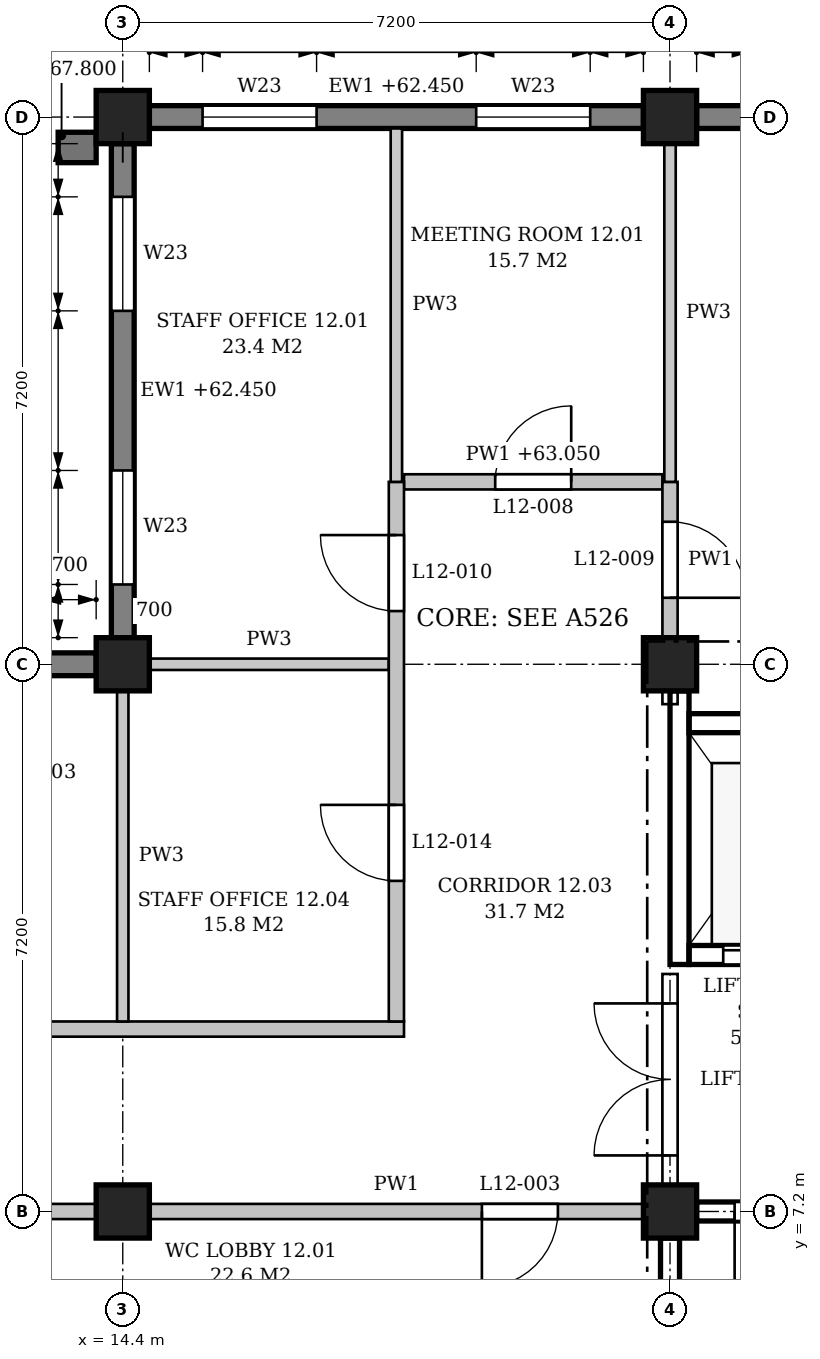
"""IFC4 building model, lengths in metres.
Left out: names, types, materials, properties, quantities, classifications, styles, units other than length and angle.
Written with IfcOpenShell. Run it as: python <this file> out.ifc"""

import sys

from ifc_helpers import new_model, si_unit, direction, frame, frame_2d, origin, origin_2d, place, context, subcontext, project, spatial, polyline, rectangle, outline, extrude, element, fill, save


model = new_model("IFC4")
c1 = context("Model", 3, precision=1e-05, world=origin(), true_north=direction((0.0, 1.0)))
c2 = subcontext(c1, "Body", "Model", "MODEL_VIEW")
j1 = project(units=[si_unit("LENGTHUNIT", "METRE"), si_unit("PLANEANGLEUNIT", "RADIAN")], contexts=[c1])
p1 = place(None, origin())
s1 = spatial("IfcSite", under=j1, at=p1, CompositionType="ELEMENT")
p2 = place(p1, origin())
s2 = spatial("IfcBuilding", under=s1, at=p2, CompositionType="ELEMENT")
p3 = place(p2, frame((0.0, 0.0, 58.8)))
s3 = spatial("IfcBuildingStorey", under=s2, at=p3, CompositionType="ELEMENT", Elevation=58.8)
for number, where, z_axis, x_axis in (
    (1, (14.4, 7.2, 0.0), (0.0, 0.0, 1.0), (1.0, 0.0, 0.0)),
    (2, (14.4, 14.4, 0.0), (0.0, 0.0, 1.0), (1.0, 0.0, 0.0)),
    (3, (14.4, 21.6, 0.0), (0.0, 0.0, 1.0), (1.0, 0.0, 0.0)),
    (4, (21.6, 7.2, 0.0), (0.0, 0.0, 1.0), (1.0, 0.0, 0.0)),
    (5, (21.6, 14.4, 0.0), (0.0, 0.0, 1.0), (1.0, 0.0, 0.0)),
    (6, (21.6, 21.6, 0.0), (0.0, 0.0, 1.0), (1.0, 0.0, 0.0)),
):
    element("IfcColumn", number, at=place(p3, frame(where, z_axis=z_axis, x_axis=x_axis)), inside=s3, PredefinedType="COLUMN", context=c2, shape_type="SweptSolid", body=[
        extrude(rectangle(XDim=0.7, YDim=0.7, at=origin_2d()), origin(), (0.0, 0.0, 1.0), 4.5),
    ])
p4 = place(p3, frame((28.45, 21.6, 0.0), z_axis=(0.0, 0.0, 1.0), x_axis=(-1.0, 0.0, 0.0)))
e7 = element("IfcWall", 7, at=p4, inside=s3, PredefinedType="STANDARD", context=c2, shape_type="SweptSolid", body=[
    extrude(rectangle(XDim=6.5, YDim=0.3, at=frame_2d((3.25, 0.0))), origin(), (0.0, 0.0, 1.0), 3.65),
])
p5 = place(p4, frame((0.7, 0.0, 0.9)))
e8 = element("IfcOpeningElement", 8, at=p5, cuts=e7, PredefinedType="OPENING", context=c2, shape_type="SweptSolid", body=[
    extrude(outline(polyline([(0.0, 0.0), (1.5, 0.0), (1.5, 1.95), (0.75, 2.7), (0.0, 1.95), (0.0, 0.0)])), frame((0.0, 0.16, 0.0), z_axis=(0.0, -1.0, 0.0), x_axis=(1.0, 0.0, 0.0)), (0.0, 0.0, 1.0), 0.32),
])
p6 = place(p4, frame((4.3, 0.0, 0.9)))
e9 = element("IfcOpeningElement", 9, at=p6, cuts=e7, PredefinedType="OPENING", context=c2, shape_type="SweptSolid", body=[
    extrude(outline(polyline([(0.0, 0.0), (1.5, 0.0), (1.5, 1.95), (0.75, 2.7), (0.0, 1.95), (0.0, 0.0)])), frame((0.0, 0.16, 0.0), z_axis=(0.0, -1.0, 0.0), x_axis=(1.0, 0.0, 0.0)), (0.0, 0.0, 1.0), 0.32),
])
p7 = place(p3, frame((21.25, 21.6, 0.0), z_axis=(0.0, 0.0, 1.0), x_axis=(-1.0, 0.0, 0.0)))
e10 = element("IfcWall", 10, at=p7, inside=s3, PredefinedType="STANDARD", context=c2, shape_type="SweptSolid", body=[
    extrude(rectangle(XDim=6.5, YDim=0.3, at=frame_2d((3.25, 0.0))), origin(), (0.0, 0.0, 1.0), 3.65),
])
p8 = place(p7, frame((0.7, 0.0, 0.9)))
e11 = element("IfcOpeningElement", 11, at=p8, cuts=e10, PredefinedType="OPENING", context=c2, shape_type="SweptSolid", body=[
    extrude(outline(polyline([(0.0, 0.0), (1.5, 0.0), (1.5, 1.95), (0.75, 2.7), (0.0, 1.95), (0.0, 0.0)])), frame((0.0, 0.16, 0.0), z_axis=(0.0, -1.0, 0.0), x_axis=(1.0, 0.0, 0.0)), (0.0, 0.0, 1.0), 0.32),
])
p9 = place(p7, frame((4.3, 0.0, 0.9)))
e12 = element("IfcOpeningElement", 12, at=p9, cuts=e10, PredefinedType="OPENING", context=c2, shape_type="SweptSolid", body=[
    extrude(outline(polyline([(0.0, 0.0), (1.5, 0.0), (1.5, 1.95), (0.75, 2.7), (0.0, 1.95), (0.0, 0.0)])), frame((0.0, 0.16, 0.0), z_axis=(0.0, -1.0, 0.0), x_axis=(1.0, 0.0, 0.0)), (0.0, 0.0, 1.0), 0.32),
])
p10 = place(p3, frame((14.05, 14.4, 0.0), z_axis=(0.0, 0.0, 1.0), x_axis=(-1.0, 0.0, 0.0)))
e13 = element("IfcWall", 13, at=p10, inside=s3, PredefinedType="STANDARD", context=c2, shape_type="SweptSolid", body=[
    extrude(rectangle(XDim=6.5, YDim=0.3, at=frame_2d((3.25, 0.0))), origin(), (0.0, 0.0, 1.0), 3.65),
])
p11 = place(p10, frame((0.7, 0.0, 0.9)))
e14 = element("IfcOpeningElement", 14, at=p11, cuts=e13, PredefinedType="OPENING", context=c2, shape_type="SweptSolid", body=[
    extrude(outline(polyline([(0.0, 0.0), (1.5, 0.0), (1.5, 1.95), (0.75, 2.7), (0.0, 1.95), (0.0, 0.0)])), frame((0.0, 0.16, 0.0), z_axis=(0.0, -1.0, 0.0), x_axis=(1.0, 0.0, 0.0)), (0.0, 0.0, 1.0), 0.32),
])
p12 = place(p10, frame((4.3, 0.0, 0.9)))
e15 = element("IfcOpeningElement", 15, at=p12, cuts=e13, PredefinedType="OPENING", context=c2, shape_type="SweptSolid", body=[
    extrude(outline(polyline([(0.0, 0.0), (1.5, 0.0), (1.5, 1.95), (0.75, 2.7), (0.0, 1.95), (0.0, 0.0)])), frame((0.0, 0.16, 0.0), z_axis=(0.0, -1.0, 0.0), x_axis=(1.0, 0.0, 0.0)), (0.0, 0.0, 1.0), 0.32),
])
p13 = place(p3, frame((14.4, 14.75, 0.0), z_axis=(0.0, 0.0, 1.0), x_axis=(0.0, 1.0, 0.0)))
e16 = element("IfcWall", 16, at=p13, inside=s3, PredefinedType="STANDARD", context=c2, shape_type="SweptSolid", body=[
    extrude(rectangle(XDim=6.5, YDim=0.3, at=frame_2d((3.25, 0.0))), origin(), (0.0, 0.0, 1.0), 3.65),
])
p14 = place(p13, frame((0.7, 0.0, 0.9)))
e17 = element("IfcOpeningElement", 17, at=p14, cuts=e16, PredefinedType="OPENING", context=c2, shape_type="SweptSolid", body=[
    extrude(outline(polyline([(0.0, 0.0), (1.5, 0.0), (1.5, 1.95), (0.75, 2.7), (0.0, 1.95), (0.0, 0.0)])), frame((0.0, 0.16, 0.0), z_axis=(0.0, -1.0, 0.0), x_axis=(1.0, 0.0, 0.0)), (0.0, 0.0, 1.0), 0.32),
])
p15 = place(p13, frame((4.3, 0.0, 0.9)))
e18 = element("IfcOpeningElement", 18, at=p15, cuts=e16, PredefinedType="OPENING", context=c2, shape_type="SweptSolid", body=[
    extrude(outline(polyline([(0.0, 0.0), (1.5, 0.0), (1.5, 1.95), (0.75, 2.7), (0.0, 1.95), (0.0, 0.0)])), frame((0.0, 0.16, 0.0), z_axis=(0.0, -1.0, 0.0), x_axis=(1.0, 0.0, 0.0)), (0.0, 0.0, 1.0), 0.32),
])
p16 = place(p3, frame((14.05, 21.2, -0.25), z_axis=(0.0, 0.0, 1.0), x_axis=(-1.0, 0.0, 0.0)))
e19 = element("IfcWall", 19, at=p16, inside=s3, PredefinedType="POLYGONAL", context=c2, shape_type="SweptSolid", body=[
    extrude(outline(polyline([(0.5, 0.0), (0.5, 8.725), (0.15, 9.25), (0.0, 9.25), (0.0, 0.0), (0.5, 0.0)])), frame((0.0, 0.2, 0.0), z_axis=(0.0, -1.0, 0.0), x_axis=(1.0, 0.0, 0.0)), (0.0, 0.0, 1.0), 0.4),
])
p17 = place(p3, frame((21.95, 7.2, 0.0), z_axis=(0.0, 0.0, 1.0), x_axis=(1.0, 0.0, 0.0)))
e20 = element("IfcWall", 20, at=p17, inside=s3, PredefinedType="SHEAR", context=c2, shape_type="SweptSolid", body=[
    extrude(rectangle(XDim=6.5, YDim=0.25, at=frame_2d((3.25, 0.0))), origin(), (0.0, 0.0, 1.0), 3.6),
])
p18 = place(p17, frame((0.5, 0.0, 0.0)))
e21 = element("IfcOpeningElement", 21, at=p18, cuts=e20, PredefinedType="OPENING", context=c2, shape_type="SweptSolid", body=[
    extrude(rectangle(XDim=1.1, YDim=2.1, at=frame_2d((0.55, 1.05))), frame((0.0, 0.135, 0.0), z_axis=(0.0, -1.0, 0.0), x_axis=(1.0, 0.0, 0.0)), (0.0, 0.0, 1.0), 0.27),
])
p19 = place(p3, frame((21.6, 0.35, 0.0), z_axis=(0.0, 0.0, 1.0), x_axis=(0.0, 1.0, 0.0)))
e22 = element("IfcWall", 22, at=p19, inside=s3, PredefinedType="SHEAR", context=c2, shape_type="SweptSolid", body=[
    extrude(rectangle(XDim=6.5, YDim=0.25, at=frame_2d((3.25, 0.0))), origin(), (0.0, 0.0, 1.0), 3.6),
])
p20 = place(p3, frame((21.725, 10.45, -0.25), z_axis=(0.0, 0.0, 1.0), x_axis=(0.0, 1.0, 0.0)))
e23 = element("IfcWall", 23, at=p20, inside=s3, PredefinedType="SHEAR", context=c2, shape_type="SweptSolid", body=[
    extrude(rectangle(XDim=3.6, YDim=0.25, at=frame_2d((1.8, 0.0))), origin(), (0.0, 0.0, 1.0), 3.85),
])
p21 = place(p3, frame((21.85, 10.575, -0.25), z_axis=(0.0, 0.0, 1.0), x_axis=(1.0, 0.0, 0.0)))
e24 = element("IfcWall", 24, at=p21, inside=s3, PredefinedType="SHEAR", context=c2, shape_type="SweptSolid", body=[
    extrude(rectangle(XDim=2.0, YDim=0.25, at=frame_2d((1.0, 0.0))), origin(), (0.0, 0.0, 1.0), 4.5),
])
p22 = place(p21, frame((0.45, 0.0, 0.25)))
e25 = element("IfcOpeningElement", 25, at=p22, cuts=e24, PredefinedType="OPENING", context=c2, shape_type="SweptSolid", body=[
    extrude(rectangle(XDim=1.1, YDim=2.1, at=frame_2d((0.55, 1.05))), frame((0.0, 0.135, 0.0), z_axis=(0.0, -1.0, 0.0), x_axis=(1.0, 0.0, 0.0)), (0.0, 0.0, 1.0), 0.27),
])
p23 = place(p3, frame((21.85, 13.625, -0.25), z_axis=(0.0, 0.0, 1.0), x_axis=(1.0, 0.0, 0.0)))
e26 = element("IfcWall", 26, at=p23, inside=s3, PredefinedType="SHEAR", context=c2, shape_type="SweptSolid", body=[
    extrude(rectangle(XDim=2.0, YDim=0.25, at=frame_2d((1.0, 0.0))), origin(), (0.0, 0.0, 1.0), 4.5),
])
p24 = place(p3, frame((7.55, 7.2, 0.0), z_axis=(0.0, 0.0, 1.0), x_axis=(1.0, 0.0, 0.0)))
e27 = element("IfcWall", 27, at=p24, inside=s3, PredefinedType="PARTITIONING", context=c2, shape_type="SweptSolid", body=[
    extrude(rectangle(XDim=6.5, YDim=0.2, at=frame_2d((3.25, 0.0))), origin(), (0.0, 0.0, 1.0), 3.6),
])
p25 = place(p24, frame((2.75, 0.0, 0.0)))
e28 = element("IfcOpeningElement", 28, at=p25, cuts=e27, PredefinedType="OPENING", context=c2, shape_type="SweptSolid", body=[
    extrude(rectangle(XDim=1.0, YDim=2.1, at=frame_2d((0.5, 1.05))), frame((0.0, 0.11, 0.0), z_axis=(0.0, -1.0, 0.0), x_axis=(1.0, 0.0, 0.0)), (0.0, 0.0, 1.0), 0.22),
])
p26 = place(p3, frame((14.75, 7.2, 0.0), z_axis=(0.0, 0.0, 1.0), x_axis=(1.0, 0.0, 0.0)))
e29 = element("IfcWall", 29, at=p26, inside=s3, PredefinedType="PARTITIONING", context=c2, shape_type="SweptSolid", body=[
    extrude(rectangle(XDim=6.5, YDim=0.2, at=frame_2d((3.25, 0.0))), origin(), (0.0, 0.0, 1.0), 3.6),
])
p27 = place(p26, frame((4.375, 0.0, 0.0)))
e30 = element("IfcOpeningElement", 30, at=p27, cuts=e29, PredefinedType="OPENING", context=c2, shape_type="SweptSolid", body=[
    extrude(rectangle(XDim=1.0, YDim=2.1, at=frame_2d((0.5, 1.05))), frame((0.0, 0.11, 0.0), z_axis=(0.0, -1.0, 0.0), x_axis=(1.0, 0.0, 0.0)), (0.0, 0.0, 1.0), 0.22),
])
p28 = place(p3, frame((3.5, 9.6, 0.0), z_axis=(0.0, 0.0, 1.0), x_axis=(1.0, 0.0, 0.0)))
e31 = element("IfcWall", 31, at=p28, inside=s3, PredefinedType="PARTITIONING", context=c2, shape_type="SweptSolid", body=[
    extrude(outline(polyline([(0.0, 0.0), (14.6, 0.0), (14.6, 4.25), (11.1, 4.25), (11.1, 3.6), (10.7, 3.6), (10.7, 4.25), (3.9, 4.25), (3.9, 3.6), (3.5, 3.6), (3.5, 4.25), (0.0, 4.25), (0.0, 0.0)])), frame((0.0, 0.1, 0.0), z_axis=(0.0, -1.0, 0.0), x_axis=(1.0, 0.0, 0.0)), (0.0, 0.0, 1.0), 0.2),
])
p29 = place(p28, frame((2.7, 0.0, 0.0)))
e32 = element("IfcOpeningElement", 32, at=p29, cuts=e31, PredefinedType="OPENING", context=c2, shape_type="SweptSolid", body=[
    extrude(rectangle(XDim=2.0, YDim=2.1, at=frame_2d((1.0, 1.05))), frame((0.0, 0.11, 0.0), z_axis=(0.0, -1.0, 0.0), x_axis=(1.0, 0.0, 0.0)), (0.0, 0.0, 1.0), 0.22),
])
p30 = place(p28, frame((8.6, 0.0, 0.0)))
e33 = element("IfcOpeningElement", 33, at=p30, cuts=e31, PredefinedType="OPENING", context=c2, shape_type="SweptSolid", body=[
    extrude(rectangle(XDim=1.0, YDim=2.1, at=frame_2d((0.5, 1.05))), frame((0.0, 0.11, 0.0), z_axis=(0.0, -1.0, 0.0), x_axis=(1.0, 0.0, 0.0)), (0.0, 0.0, 1.0), 0.22),
])
p31 = place(p3, frame((14.75, 14.4, 0.0), z_axis=(0.0, 0.0, 1.0), x_axis=(1.0, 0.0, 0.0)))
e34 = element("IfcWall", 34, at=p31, inside=s3, PredefinedType="PARTITIONING", context=c2, shape_type="SweptSolid", body=[
    extrude(rectangle(XDim=3.15, YDim=0.15, at=frame_2d((1.575, 0.0))), origin(), (0.0, 0.0, 1.0), 3.6),
])
p32 = place(p3, frame((18.1, 16.8, 0.0), z_axis=(0.0, 0.0, 1.0), x_axis=(1.0, 0.0, 0.0)))
e35 = element("IfcWall", 35, at=p32, inside=s3, PredefinedType="PARTITIONING", context=c2, shape_type="SweptSolid", body=[
    extrude(outline(polyline([(0.0, 0.0), (3.4, 0.0), (3.4, 3.6), (3.3, 3.6), (3.3, 4.25), (0.0, 4.25), (0.0, 0.0)])), frame((0.0, 0.1, 0.0), z_axis=(0.0, -1.0, 0.0), x_axis=(1.0, 0.0, 0.0)), (0.0, 0.0, 1.0), 0.2),
])
p33 = place(p32, frame((1.2, 0.0, 0.0)))
e36 = element("IfcOpeningElement", 36, at=p33, cuts=e35, PredefinedType="OPENING", context=c2, shape_type="SweptSolid", body=[
    extrude(rectangle(XDim=1.0, YDim=2.1, at=frame_2d((0.5, 1.05))), frame((0.0, 0.11, 0.0), z_axis=(0.0, -1.0, 0.0), x_axis=(1.0, 0.0, 0.0)), (0.0, 0.0, 1.0), 0.22),
])
p34 = place(p3, frame((14.4, 9.7, 0.0), z_axis=(0.0, 0.0, 1.0), x_axis=(0.0, 1.0, 0.0)))
e37 = element("IfcWall", 37, at=p34, inside=s3, PredefinedType="PARTITIONING", context=c2, shape_type="SweptSolid", body=[
    extrude(rectangle(XDim=4.35, YDim=0.15, at=frame_2d((2.175, 0.0))), origin(), (0.0, 0.0, 1.0), 3.6),
])
p35 = place(p3, frame((18.0, 9.7, 0.0), z_axis=(0.0, 0.0, 1.0), x_axis=(0.0, 1.0, 0.0)))
e38 = element("IfcWall", 38, at=p35, inside=s3, PredefinedType="PARTITIONING", context=c2, shape_type="SweptSolid", body=[
    extrude(outline(polyline([(0.0, 0.0), (7.1, 0.0), (7.1, 4.25), (4.9, 4.25), (4.9, 3.6), (4.5, 3.6), (4.5, 4.25), (0.0, 4.25), (0.0, 0.0)])), frame((0.0, 0.1, 0.0), z_axis=(0.0, -1.0, 0.0), x_axis=(1.0, 0.0, 0.0)), (0.0, 0.0, 1.0), 0.2),
])
p36 = place(p35, frame((5.4, 0.0, 0.0)))
e39 = element("IfcOpeningElement", 39, at=p36, cuts=e38, PredefinedType="OPENING", context=c2, shape_type="SweptSolid", body=[
    extrude(rectangle(XDim=1.0, YDim=2.1, at=frame_2d((0.5, 1.05))), frame((0.0, 0.11, 0.0), z_axis=(0.0, -1.0, 0.0), x_axis=(1.0, 0.0, 0.0)), (0.0, 0.0, 1.0), 0.22),
])
p37 = place(p35, frame((1.85, 0.0, 0.0)))
e40 = element("IfcOpeningElement", 40, at=p37, cuts=e38, PredefinedType="OPENING", context=c2, shape_type="SweptSolid", body=[
    extrude(rectangle(XDim=1.0, YDim=2.1, at=frame_2d((0.5, 1.05))), frame((0.0, 0.11, 0.0), z_axis=(0.0, -1.0, 0.0), x_axis=(1.0, 0.0, 0.0)), (0.0, 0.0, 1.0), 0.22),
])
p38 = place(p3, frame((18.0, 16.8, 0.0), z_axis=(0.0, 0.0, 1.0), x_axis=(0.0, 1.0, 0.0)))
e41 = element("IfcWall", 41, at=p38, inside=s3, PredefinedType="PARTITIONING", context=c2, shape_type="SweptSolid", body=[
    extrude(rectangle(XDim=4.65, YDim=0.15, at=frame_2d((2.325, 0.0))), origin(), (0.0, 0.0, 1.0), 3.6),
])
p39 = place(p3, frame((21.6, 7.55, 0.0), z_axis=(0.0, 0.0, 1.0), x_axis=(0.0, 1.0, 0.0)))
e42 = element("IfcWall", 42, at=p39, inside=s3, PredefinedType="PARTITIONING", context=c2, shape_type="SweptSolid", body=[
    extrude(rectangle(XDim=2.775, YDim=0.2, at=frame_2d((1.387, 0.0))), origin(), (0.0, 0.0, 1.0), 3.6),
])
p40 = place(p39, frame((0.387, 0.0, 0.0)))
e43 = element("IfcOpeningElement", 43, at=p40, cuts=e42, PredefinedType="OPENING", context=c2, shape_type="SweptSolid", body=[
    extrude(rectangle(XDim=2.0, YDim=2.4, at=frame_2d((1.0, 1.2))), frame((0.0, 0.11, 0.0), z_axis=(0.0, -1.0, 0.0), x_axis=(1.0, 0.0, 0.0)), (0.0, 0.0, 1.0), 0.22),
])
p41 = place(p3, frame((21.6, 13.875, 0.0), z_axis=(0.0, 0.0, 1.0), x_axis=(0.0, 1.0, 0.0)))
e44 = element("IfcWall", 44, at=p41, inside=s3, PredefinedType="PARTITIONING", context=c2, shape_type="SweptSolid", body=[
    extrude(rectangle(XDim=0.175, YDim=0.2, at=frame_2d((0.087, 0.0))), origin(), (0.0, 0.0, 1.0), 3.6),
])
p42 = place(p3, frame((21.6, 14.75, 0.0), z_axis=(0.0, 0.0, 1.0), x_axis=(0.0, 1.0, 0.0)))
e45 = element("IfcWall", 45, at=p42, inside=s3, PredefinedType="PARTITIONING", context=c2, shape_type="SweptSolid", body=[
    extrude(rectangle(XDim=2.05, YDim=0.2, at=frame_2d((1.025, 0.0))), origin(), (0.0, 0.0, 1.0), 3.6),
])
p43 = place(p42, frame((0.525, 0.0, 0.0)))
e46 = element("IfcOpeningElement", 46, at=p43, cuts=e45, PredefinedType="OPENING", context=c2, shape_type="SweptSolid", body=[
    extrude(rectangle(XDim=1.0, YDim=2.1, at=frame_2d((0.5, 1.05))), frame((0.0, 0.11, 0.0), z_axis=(0.0, -1.0, 0.0), x_axis=(1.0, 0.0, 0.0)), (0.0, 0.0, 1.0), 0.22),
])
p44 = place(p3, frame((21.6, 16.8, 0.0), z_axis=(0.0, 0.0, 1.0), x_axis=(0.0, 1.0, 0.0)))
e47 = element("IfcWall", 47, at=p44, inside=s3, PredefinedType="PARTITIONING", context=c2, shape_type="SweptSolid", body=[
    extrude(rectangle(XDim=4.45, YDim=0.15, at=frame_2d((2.225, 0.0))), origin(), (0.0, 0.0, 1.0), 3.6),
])
p45 = place(p8, origin())
e48 = element("IfcWindow", 48, at=p45, inside=s3, PartitioningType="SINGLE_PANEL", PredefinedType="WINDOW", context=c2, shape_type="SweptSolid", body=[
    extrude(outline(polyline([(0.0, 0.0), (1.5, 0.0), (1.5, 1.95), (0.75, 2.7), (0.0, 1.95), (0.0, 0.0)])), frame((0.0, 0.03, 0.0), z_axis=(0.0, -1.0, 0.0), x_axis=(1.0, 0.0, 0.0)), (0.0, 0.0, 1.0), 0.06),
])
fill(e11, e48)
p46 = place(p9, origin())
e49 = element("IfcWindow", 49, at=p46, inside=s3, PartitioningType="SINGLE_PANEL", PredefinedType="WINDOW", context=c2, shape_type="SweptSolid", body=[
    extrude(outline(polyline([(0.0, 0.0), (1.5, 0.0), (1.5, 1.95), (0.75, 2.7), (0.0, 1.95), (0.0, 0.0)])), frame((0.0, 0.03, 0.0), z_axis=(0.0, -1.0, 0.0), x_axis=(1.0, 0.0, 0.0)), (0.0, 0.0, 1.0), 0.06),
])
fill(e12, e49)
p47 = place(p14, origin())
e50 = element("IfcWindow", 50, at=p47, inside=s3, PartitioningType="SINGLE_PANEL", PredefinedType="WINDOW", context=c2, shape_type="SweptSolid", body=[
    extrude(outline(polyline([(0.0, 0.0), (1.5, 0.0), (1.5, 1.95), (0.75, 2.7), (0.0, 1.95), (0.0, 0.0)])), frame((0.0, 0.03, 0.0), z_axis=(0.0, -1.0, 0.0), x_axis=(1.0, 0.0, 0.0)), (0.0, 0.0, 1.0), 0.06),
])
fill(e17, e50)
p48 = place(p15, origin())
e51 = element("IfcWindow", 51, at=p48, inside=s3, PartitioningType="SINGLE_PANEL", PredefinedType="WINDOW", context=c2, shape_type="SweptSolid", body=[
    extrude(outline(polyline([(0.0, 0.0), (1.5, 0.0), (1.5, 1.95), (0.75, 2.7), (0.0, 1.95), (0.0, 0.0)])), frame((0.0, 0.03, 0.0), z_axis=(0.0, -1.0, 0.0), x_axis=(1.0, 0.0, 0.0)), (0.0, 0.0, 1.0), 0.06),
])
fill(e18, e51)
p49 = place(p18, frame((1.1, 0.0, 0.0), z_axis=(0.0, 0.0, 1.0), x_axis=(-1.0, 0.0, 0.0)))
e52 = element("IfcDoor", 52, at=p49, inside=s3, OperationType="SINGLE_SWING_RIGHT", PredefinedType="DOOR", context=c2, shape_type="SweptSolid", body=[
    extrude(rectangle(XDim=1.1, YDim=2.1, at=frame_2d((0.55, 1.05))), frame((0.0, 0.025, 0.0), z_axis=(0.0, -1.0, 0.0), x_axis=(1.0, 0.0, 0.0)), (0.0, 0.0, 1.0), 0.05),
])
fill(e21, e52)
p50 = place(p22, origin())
e53 = element("IfcDoor", 53, at=p50, inside=s3, OperationType="SLIDING_TO_LEFT", PredefinedType="DOOR", context=c2, shape_type="SweptSolid", body=[
    extrude(rectangle(XDim=1.1, YDim=2.1, at=frame_2d((0.55, 1.05))), frame((0.0, 0.025, 0.0), z_axis=(0.0, -1.0, 0.0), x_axis=(1.0, 0.0, 0.0)), (0.0, 0.0, 1.0), 0.05),
])
fill(e25, e53)
p51 = place(p40, origin())
e54 = element("IfcDoor", 54, at=p51, inside=s3, OperationType="DOUBLE_DOOR_SINGLE_SWING", PredefinedType="DOOR", context=c2, shape_type="SweptSolid", body=[
    extrude(rectangle(XDim=2.0, YDim=2.4, at=frame_2d((1.0, 1.2))), frame((0.0, 0.025, 0.0), z_axis=(0.0, -1.0, 0.0), x_axis=(1.0, 0.0, 0.0)), (0.0, 0.0, 1.0), 0.05),
])
fill(e43, e54)
p52 = place(p27, frame((1.0, 0.0, 0.0), z_axis=(0.0, 0.0, 1.0), x_axis=(-1.0, 0.0, 0.0)))
e55 = element("IfcDoor", 55, at=p52, inside=s3, OperationType="SINGLE_SWING_RIGHT", PredefinedType="DOOR", context=c2, shape_type="SweptSolid", body=[
    extrude(rectangle(XDim=1.0, YDim=2.1, at=frame_2d((0.5, 1.05))), frame((0.0, 0.025, 0.0), z_axis=(0.0, -1.0, 0.0), x_axis=(1.0, 0.0, 0.0)), (0.0, 0.0, 1.0), 0.05),
])
fill(e30, e55)
p53 = place(p33, origin())
e56 = element("IfcDoor", 56, at=p53, inside=s3, OperationType="SINGLE_SWING_RIGHT", PredefinedType="DOOR", context=c2, shape_type="SweptSolid", body=[
    extrude(rectangle(XDim=1.0, YDim=2.1, at=frame_2d((0.5, 1.05))), frame((0.0, 0.025, 0.0), z_axis=(0.0, -1.0, 0.0), x_axis=(1.0, 0.0, 0.0)), (0.0, 0.0, 1.0), 0.05),
])
fill(e36, e56)
p54 = place(p43, frame((1.0, 0.0, 0.0), z_axis=(0.0, 0.0, 1.0), x_axis=(-1.0, 0.0, 0.0)))
e57 = element("IfcDoor", 57, at=p54, inside=s3, OperationType="SINGLE_SWING_RIGHT", PredefinedType="DOOR", context=c2, shape_type="SweptSolid", body=[
    extrude(rectangle(XDim=1.0, YDim=2.1, at=frame_2d((0.5, 1.05))), frame((0.0, 0.025, 0.0), z_axis=(0.0, -1.0, 0.0), x_axis=(1.0, 0.0, 0.0)), (0.0, 0.0, 1.0), 0.05),
])
fill(e46, e57)
p55 = place(p36, origin())
e58 = element("IfcDoor", 58, at=p55, inside=s3, OperationType="SINGLE_SWING_RIGHT", PredefinedType="DOOR", context=c2, shape_type="SweptSolid", body=[
    extrude(rectangle(XDim=1.0, YDim=2.1, at=frame_2d((0.5, 1.05))), frame((0.0, 0.025, 0.0), z_axis=(0.0, -1.0, 0.0), x_axis=(1.0, 0.0, 0.0)), (0.0, 0.0, 1.0), 0.05),
])
fill(e39, e58)
p56 = place(p37, origin())
e59 = element("IfcDoor", 59, at=p56, inside=s3, OperationType="SINGLE_SWING_RIGHT", PredefinedType="DOOR", context=c2, shape_type="SweptSolid", body=[
    extrude(rectangle(XDim=1.0, YDim=2.1, at=frame_2d((0.5, 1.05))), frame((0.0, 0.025, 0.0), z_axis=(0.0, -1.0, 0.0), x_axis=(1.0, 0.0, 0.0)), (0.0, 0.0, 1.0), 0.05),
])
fill(e40, e59)
save(model, sys.argv[1])
